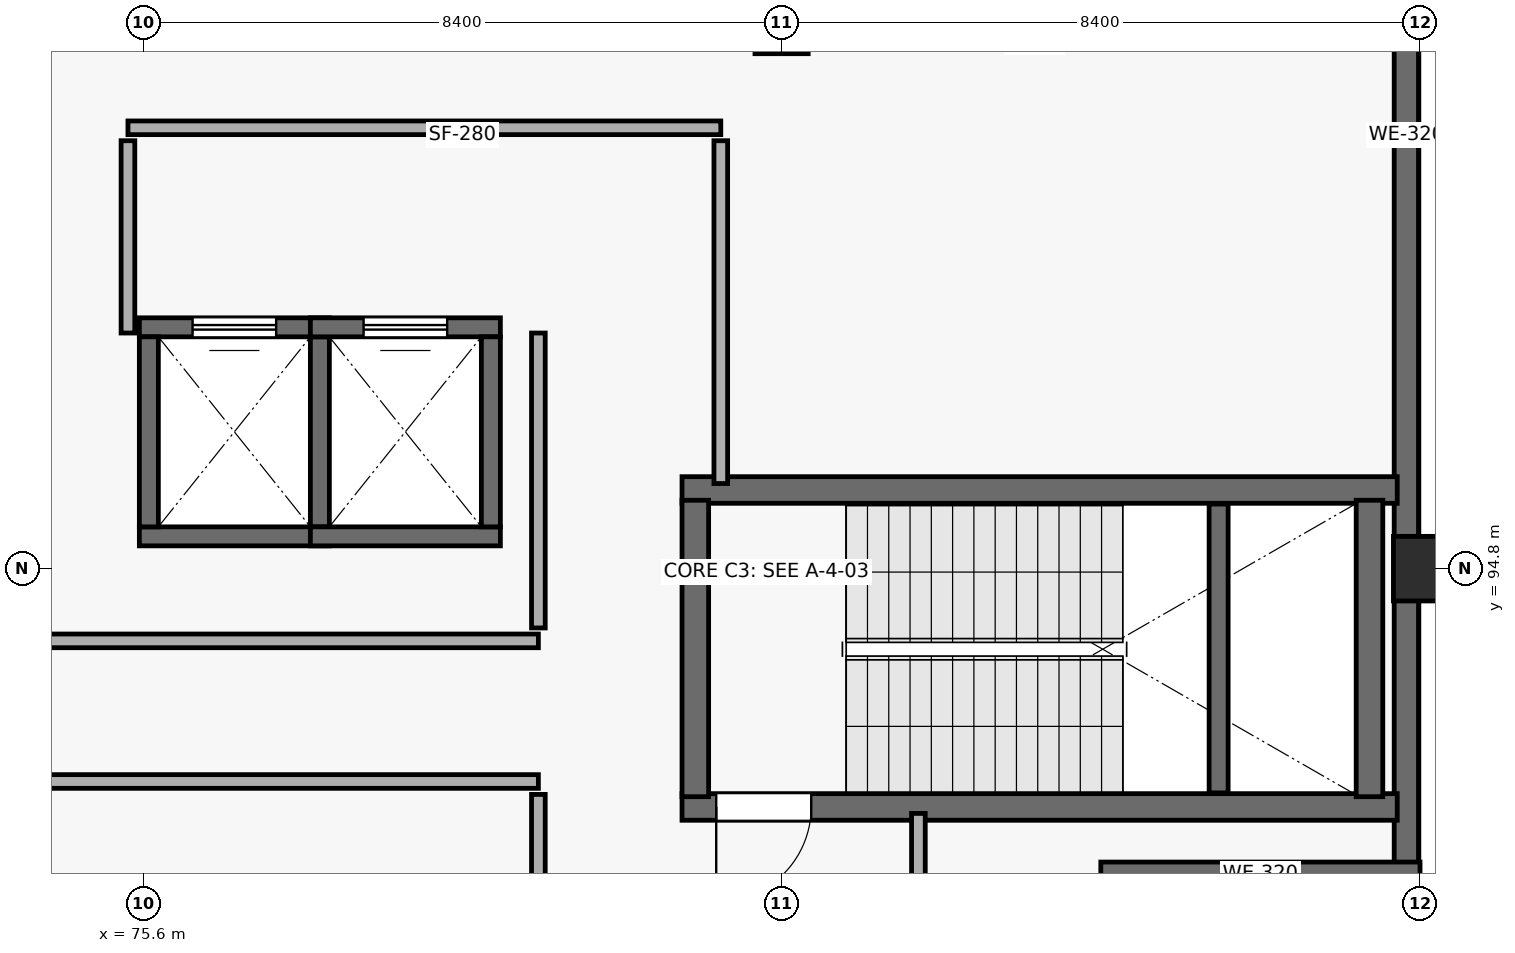
"""IFC4 building model, lengths in metres.
Left out: names, types, materials, properties, quantities, classifications, styles, units other than length and angle.
Written with IfcOpenShell. Run it as: python <this file> out.ifc"""

import sys

from ifc_helpers import new_model, si_unit, direction, frame, frame_2d, origin, origin_2d, place, context, subcontext, project, spatial, rectangle, extrude, element, fill, save


model = new_model("IFC4")
c1 = context("Model", 3, precision=1e-05, world=origin(), true_north=direction((0.0, 1.0)))
c2 = subcontext(c1, "Body", "Model", "MODEL_VIEW")
j1 = project(units=[si_unit("LENGTHUNIT", "METRE"), si_unit("PLANEANGLEUNIT", "RADIAN")], contexts=[c1])
p1 = place(None, origin())
s1 = spatial("IfcSite", under=j1, at=p1, CompositionType="ELEMENT")
p2 = place(p1, origin())
s2 = spatial("IfcBuilding", under=s1, at=p2, CompositionType="ELEMENT")
p3 = place(p2, frame((0.0, 0.0, 15.3)))
s3 = spatial("IfcBuildingStorey", under=s2, at=p3, CompositionType="ELEMENT", Elevation=15.3)
for number, where, z_axis, x_axis in (
    (1, (84.0, 102.0, 0.0), (0.0, 0.0, 1.0), (1.0, 0.0, 0.0)),
    (2, (92.4, 94.8, 0.0), (0.0, 0.0, 1.0), (1.0, 0.0, 0.0)),
):
    element("IfcColumn", number, at=place(p3, frame(where, z_axis=z_axis, x_axis=x_axis)), inside=s3, PredefinedType="COLUMN", context=c2, shape_type="SweptSolid", body=[
        extrude(rectangle(XDim=0.7, YDim=0.85, at=origin_2d()), origin(), (0.0, 0.0, 1.0), 5.1),
    ])
p4 = place(p3, frame((92.22, 110.4, 0.0), z_axis=(0.0, 0.0, 1.0), x_axis=(0.0, -1.0, 0.0)))
e3 = element("IfcWall", 3, at=p4, inside=s3, PredefinedType="SOLIDWALL", context=c2, shape_type="SweptSolid", body=[
    extrude(rectangle(XDim=19.8, YDim=0.32, at=frame_2d((9.9, 0.0))), origin(), (0.0, 0.0, 1.0), 4.82),
])
p5 = place(p4, frame((5.12, 0.0, 0.75)))
e4 = element("IfcOpeningElement", 4, at=p5, cuts=e3, PredefinedType="OPENING", context=c2, shape_type="SweptSolid", body=[
    extrude(rectangle(XDim=0.96, YDim=2.65, at=frame_2d((0.48, 1.325))), frame((0.0, 0.17, 0.0), z_axis=(0.0, -1.0, 0.0), x_axis=(1.0, 0.0, 0.0)), (0.0, 0.0, 1.0), 0.34),
])
p6 = place(p3, frame((92.4, 90.78, 0.0), z_axis=(0.0, 0.0, 1.0), x_axis=(-1.0, 0.0, 0.0)))
e5 = element("IfcWall", 5, at=p6, inside=s3, PredefinedType="SOLIDWALL", context=c2, shape_type="SweptSolid", body=[
    extrude(rectangle(XDim=4.2, YDim=0.32, at=frame_2d((2.1, 0.0))), origin(), (0.0, 0.0, 1.0), 4.82),
])
p7 = place(p3, frame((82.69, 91.665, 0.0), z_axis=(0.0, 0.0, 1.0), x_axis=(1.0, 0.0, 0.0)))
e6 = element("IfcWall", 6, at=p7, inside=s3, PredefinedType="SHEAR", context=c2, shape_type="SweptSolid", body=[
    extrude(rectangle(XDim=9.41, YDim=0.35, at=frame_2d((4.705, 0.0))), origin(), (0.0, 0.0, 1.0), 4.82),
])
p8 = place(p7, frame((0.45, 0.0, 0.0)))
e7 = element("IfcOpeningElement", 7, at=p8, cuts=e6, PredefinedType="OPENING", context=c2, shape_type="SweptSolid", body=[
    extrude(rectangle(XDim=1.25, YDim=2.2, at=frame_2d((0.625, 1.1))), frame((0.0, 0.185, 0.0), z_axis=(0.0, -1.0, 0.0), x_axis=(1.0, 0.0, 0.0)), (0.0, 0.0, 1.0), 0.37),
])
p9 = place(p3, frame((92.1, 95.835, 0.0), z_axis=(0.0, 0.0, 1.0), x_axis=(-1.0, 0.0, 0.0)))
e8 = element("IfcWall", 8, at=p9, inside=s3, PredefinedType="SHEAR", context=c2, shape_type="SweptSolid", body=[
    extrude(rectangle(XDim=9.41, YDim=0.35, at=frame_2d((4.705, 0.0))), origin(), (0.0, 0.0, 1.0), 4.82),
])
for number, where, z_axis, x_axis in (
    (9, (82.865, 91.8, 0.0), (0.0, 0.0, 1.0), (0.0, 1.0, 0.0)),
    (10, (91.735, 95.7, 0.0), (0.0, 0.0, 1.0), (0.0, -1.0, 0.0)),
):
    element("IfcWall", number, at=place(p3, frame(where, z_axis=z_axis, x_axis=x_axis)), inside=s3, PredefinedType="SHEAR", context=c2, shape_type="SweptSolid", body=[
        extrude(rectangle(XDim=3.9, YDim=0.35, at=frame_2d((1.95, 0.0))), origin(), (0.0, 0.0, 1.0), 4.82),
    ])
p10 = place(p3, frame((89.75, 91.85, 0.0), z_axis=(0.0, 0.0, 1.0), x_axis=(0.0, 1.0, 0.0)))
e11 = element("IfcWall", 11, at=p10, inside=s3, PredefinedType="SHEAR", context=c2, shape_type="SweptSolid", body=[
    extrude(rectangle(XDim=3.8, YDim=0.25, at=frame_2d((1.9, 0.0))), origin(), (0.0, 0.0, 1.0), 2.37),
])
p11 = place(p3, frame((75.55, 95.225, 0.0), z_axis=(0.0, 0.0, 1.0), x_axis=(1.0, 0.0, 0.0)))
e12 = element("IfcWall", 12, at=p11, inside=s3, PredefinedType="SHEAR", context=c2, shape_type="SweptSolid", body=[
    extrude(rectangle(XDim=2.5, YDim=0.25, at=frame_2d((1.25, 0.0))), origin(), (0.0, 0.0, 1.0), 4.82),
])
p12 = place(p3, frame((78.05, 97.975, 0.0), z_axis=(0.0, 0.0, 1.0), x_axis=(-1.0, 0.0, 0.0)))
e13 = element("IfcWall", 13, at=p12, inside=s3, PredefinedType="SHEAR", context=c2, shape_type="SweptSolid", body=[
    extrude(rectangle(XDim=2.5, YDim=0.25, at=frame_2d((1.25, 0.0))), origin(), (0.0, 0.0, 1.0), 4.82),
])
p13 = place(p12, frame((0.7, 0.0, 0.0)))
e14 = element("IfcOpeningElement", 14, at=p13, cuts=e13, PredefinedType="OPENING", context=c2, shape_type="SweptSolid", body=[
    extrude(rectangle(XDim=1.1, YDim=2.2, at=frame_2d((0.55, 1.1))), frame((0.0, 0.135, 0.0), z_axis=(0.0, -1.0, 0.0), x_axis=(1.0, 0.0, 0.0)), (0.0, 0.0, 1.0), 0.27),
])
for number, where, z_axis, x_axis in (
    (15, (75.675, 95.35, 0.0), (0.0, 0.0, 1.0), (0.0, 1.0, 0.0)),
    (16, (77.925, 97.85, 0.0), (0.0, 0.0, 1.0), (0.0, -1.0, 0.0)),
    (17, (77.8, 95.225, 0.0), (0.0, 0.0, 1.0), (1.0, 0.0, 0.0)),
):
    element("IfcWall", number, at=place(p3, frame(where, z_axis=z_axis, x_axis=x_axis)), inside=s3, PredefinedType="SHEAR", context=c2, shape_type="SweptSolid", body=[
        extrude(rectangle(XDim=2.5, YDim=0.25, at=frame_2d((1.25, 0.0))), origin(), (0.0, 0.0, 1.0), 4.82),
    ])
p14 = place(p3, frame((80.3, 97.975, 0.0), z_axis=(0.0, 0.0, 1.0), x_axis=(-1.0, 0.0, 0.0)))
e18 = element("IfcWall", 18, at=p14, inside=s3, PredefinedType="SHEAR", context=c2, shape_type="SweptSolid", body=[
    extrude(rectangle(XDim=2.5, YDim=0.25, at=frame_2d((1.25, 0.0))), origin(), (0.0, 0.0, 1.0), 4.82),
])
p15 = place(p14, frame((0.7, 0.0, 0.0)))
e19 = element("IfcOpeningElement", 19, at=p15, cuts=e18, PredefinedType="OPENING", context=c2, shape_type="SweptSolid", body=[
    extrude(rectangle(XDim=1.1, YDim=2.2, at=frame_2d((0.55, 1.1))), frame((0.0, 0.135, 0.0), z_axis=(0.0, -1.0, 0.0), x_axis=(1.0, 0.0, 0.0)), (0.0, 0.0, 1.0), 0.27),
])
p16 = place(p3, frame((80.175, 97.85, 0.0), z_axis=(0.0, 0.0, 1.0), x_axis=(0.0, -1.0, 0.0)))
e20 = element("IfcWall", 20, at=p16, inside=s3, PredefinedType="SHEAR", context=c2, shape_type="SweptSolid", body=[
    extrude(rectangle(XDim=2.5, YDim=0.25, at=frame_2d((1.25, 0.0))), origin(), (0.0, 0.0, 1.0), 4.82),
])
p17 = place(p3, frame((67.345, 92.0, 0.0), z_axis=(0.0, 0.0, 1.0), x_axis=(1.0, 0.0, 0.0)))
e21 = element("IfcWall", 21, at=p17, inside=s3, PredefinedType="PARTITIONING", context=c2, shape_type="SweptSolid", body=[
    extrude(rectangle(XDim=13.455, YDim=0.18, at=frame_2d((6.728, 0.0))), origin(), (0.0, 0.0, 1.0), 4.82),
])
p18 = place(p3, frame((80.8, 93.85, 0.0), z_axis=(0.0, 0.0, 1.0), x_axis=(-1.0, 0.0, 0.0)))
e22 = element("IfcWall", 22, at=p18, inside=s3, PredefinedType="PARTITIONING", context=c2, shape_type="SweptSolid", body=[
    extrude(rectangle(XDim=13.445, YDim=0.18, at=frame_2d((6.723, 0.0))), origin(), (0.0, 0.0, 1.0), 4.82),
])
p19 = place(p3, frame((83.2, 100.6, 0.0), z_axis=(0.0, 0.0, 1.0), x_axis=(-1.0, 0.0, 0.0)))
e23 = element("IfcWall", 23, at=p19, inside=s3, PredefinedType="PARTITIONING", context=c2, shape_type="SweptSolid", body=[
    extrude(rectangle(XDim=7.8, YDim=0.18, at=frame_2d((3.9, 0.0))), origin(), (0.0, 0.0, 1.0), 4.82),
])
p20 = place(p3, frame((83.2, 95.92, 0.0), z_axis=(0.0, 0.0, 1.0), x_axis=(0.0, 1.0, 0.0)))
e24 = element("IfcWall", 24, at=p20, inside=s3, PredefinedType="PARTITIONING", context=c2, shape_type="SweptSolid", body=[
    extrude(rectangle(XDim=4.51, YDim=0.18, at=frame_2d((2.255, 0.0))), origin(), (0.0, 0.0, 1.0), 4.82),
])
p21 = place(p3, frame((80.8, 97.9, 0.0), z_axis=(0.0, 0.0, 1.0), x_axis=(0.0, -1.0, 0.0)))
e25 = element("IfcWall", 25, at=p21, inside=s3, PredefinedType="PARTITIONING", context=c2, shape_type="SweptSolid", body=[
    extrude(rectangle(XDim=3.88, YDim=0.18, at=frame_2d((1.94, 0.0))), origin(), (0.0, 0.0, 1.0), 4.82),
])
p22 = place(p3, frame((80.8, 91.83, 0.0), z_axis=(0.0, 0.0, 1.0), x_axis=(0.0, -1.0, 0.0)))
e26 = element("IfcWall", 26, at=p22, inside=s3, PredefinedType="PARTITIONING", context=c2, shape_type="SweptSolid", body=[
    extrude(rectangle(XDim=2.46, YDim=0.18, at=frame_2d((1.23, 0.0))), origin(), (0.0, 0.0, 1.0), 4.82),
])
p23 = place(p3, frame((75.4, 100.43, 0.0), z_axis=(0.0, 0.0, 1.0), x_axis=(0.0, -1.0, 0.0)))
e27 = element("IfcWall", 27, at=p23, inside=s3, PredefinedType="PARTITIONING", context=c2, shape_type="SweptSolid", body=[
    extrude(rectangle(XDim=2.53, YDim=0.18, at=frame_2d((1.265, 0.0))), origin(), (0.0, 0.0, 1.0), 3.45),
])
p24 = place(p3, frame((85.8, 89.37, 0.0), z_axis=(0.0, 0.0, 1.0), x_axis=(0.0, 1.0, 0.0)))
e28 = element("IfcWall", 28, at=p24, inside=s3, PredefinedType="PARTITIONING", context=c2, shape_type="SweptSolid", body=[
    extrude(rectangle(XDim=2.21, YDim=0.18, at=frame_2d((1.105, 0.0))), origin(), (0.0, 0.0, 1.0), 4.82),
])
p25 = place(p8, origin())
e29 = element("IfcDoor", 29, at=p25, inside=s3, OperationType="SINGLE_SWING_RIGHT", PredefinedType="DOOR", context=c2, shape_type="SweptSolid", body=[
    extrude(rectangle(XDim=1.25, YDim=2.2, at=frame_2d((0.625, 1.1))), frame((0.0, 0.025, 0.0), z_axis=(0.0, -1.0, 0.0), x_axis=(1.0, 0.0, 0.0)), (0.0, 0.0, 1.0), 0.05),
])
fill(e7, e29)
p26 = place(p13, origin())
e30 = element("IfcDoor", 30, at=p26, inside=s3, OperationType="SLIDING_TO_LEFT", PredefinedType="DOOR", context=c2, shape_type="SweptSolid", body=[
    extrude(rectangle(XDim=1.1, YDim=2.2, at=frame_2d((0.55, 1.1))), frame((0.0, 0.025, 0.0), z_axis=(0.0, -1.0, 0.0), x_axis=(1.0, 0.0, 0.0)), (0.0, 0.0, 1.0), 0.05),
])
fill(e14, e30)
p27 = place(p15, origin())
e31 = element("IfcDoor", 31, at=p27, inside=s3, OperationType="SLIDING_TO_LEFT", PredefinedType="DOOR", context=c2, shape_type="SweptSolid", body=[
    extrude(rectangle(XDim=1.1, YDim=2.2, at=frame_2d((0.55, 1.1))), frame((0.0, 0.025, 0.0), z_axis=(0.0, -1.0, 0.0), x_axis=(1.0, 0.0, 0.0)), (0.0, 0.0, 1.0), 0.05),
])
fill(e19, e31)
save(model, sys.argv[1])
